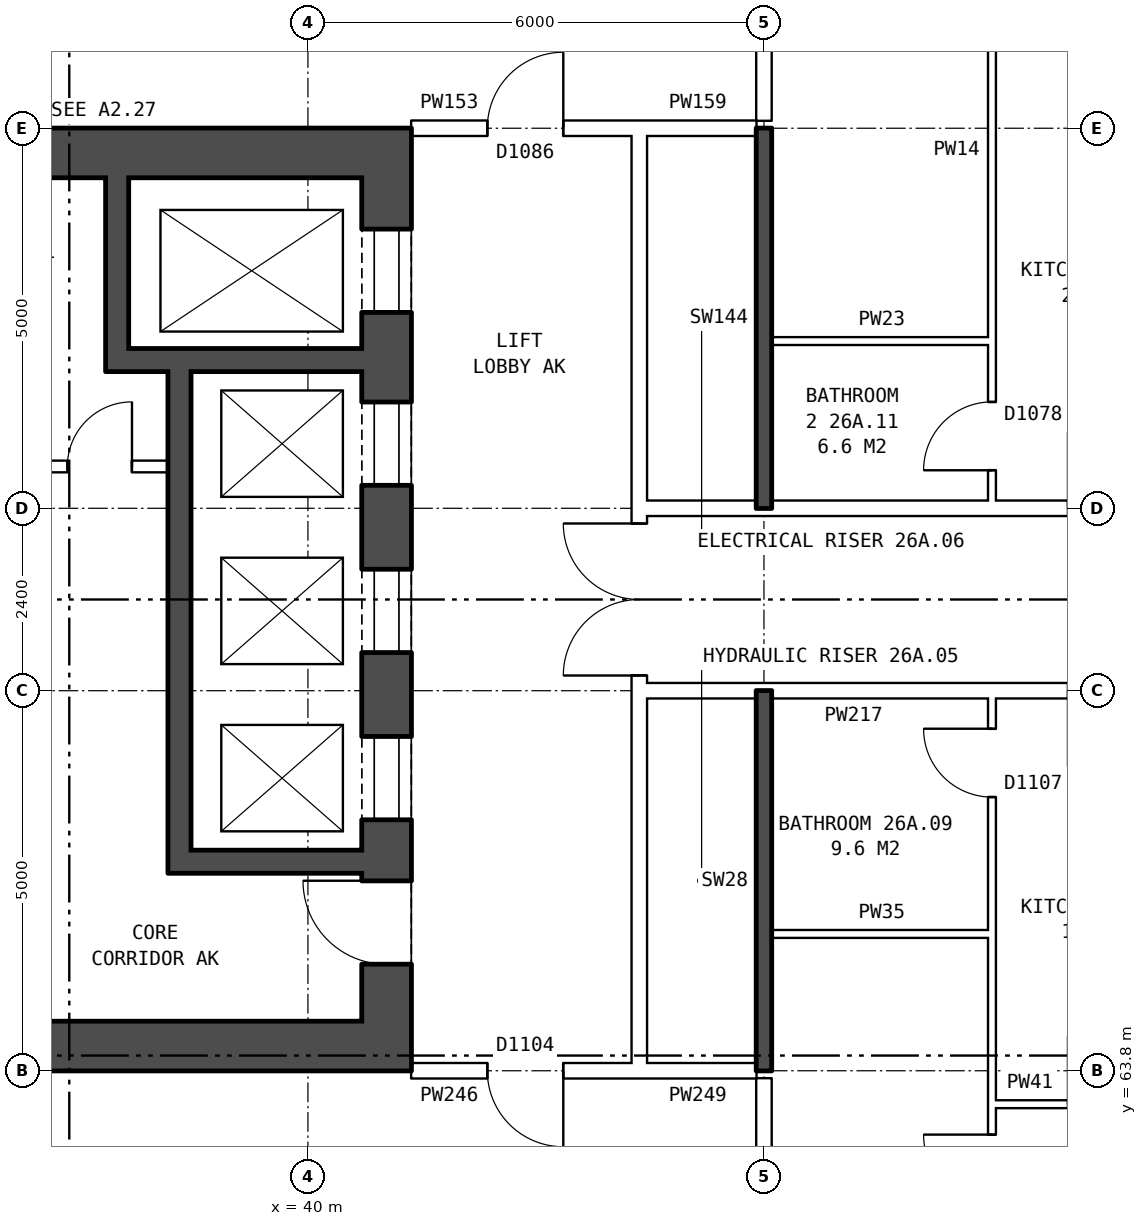
"""IFC4 building model, lengths in metres.
Left out: names, types, materials, properties, quantities, classifications, styles, units other than length and angle.
Written with IfcOpenShell. Run it as: python <this file> out.ifc"""

import sys

from ifc_helpers import new_model, si_unit, direction, frame, frame_2d, origin, place, context, subcontext, project, spatial, rectangle, extrude, element, fill, save


model = new_model("IFC4")
c1 = context("Model", 3, precision=1e-05, world=origin(), true_north=direction((0.0, 1.0)))
c2 = subcontext(c1, "Body", "Model", "MODEL_VIEW")
j1 = project(units=[si_unit("LENGTHUNIT", "METRE"), si_unit("PLANEANGLEUNIT", "RADIAN")], contexts=[c1])
p1 = place(None, origin())
s1 = spatial("IfcSite", under=j1, at=p1, CompositionType="ELEMENT")
p2 = place(p1, origin())
s2 = spatial("IfcBuilding", under=s1, at=p2, CompositionType="ELEMENT")
p3 = place(p2, frame((0.0, 0.0, 96.4)))
s3 = spatial("IfcBuildingStorey", under=s2, at=p3, CompositionType="ELEMENT", Elevation=96.4)
p4 = place(p3, frame((41.035, 75.55, 0.0), z_axis=(0.0, 0.0, 1.0), x_axis=(0.0, -1.0, 0.0)))
e1 = element("IfcWall", 1, at=p4, inside=s3, PredefinedType="SHEAR", context=c2, shape_type="SweptSolid", body=[
    extrude(rectangle(XDim=11.1, YDim=0.65, at=frame_2d((5.55, 0.0))), origin(), (0.0, 0.0, 1.0), 2.85),
])
p5 = place(p4, frame((0.675, 0.0, 0.0)))
e2 = element("IfcOpeningElement", 2, at=p5, cuts=e1, PredefinedType="OPENING", context=c2, shape_type="SweptSolid", body=[
    extrude(rectangle(XDim=1.1, YDim=2.1, at=frame_2d((0.55, 1.05))), frame((0.0, 0.335, 0.0), z_axis=(0.0, -1.0, 0.0), x_axis=(1.0, 0.0, 0.0)), (0.0, 0.0, 1.0), 0.67),
])
p6 = place(p4, frame((2.95, 0.0, 0.0)))
e3 = element("IfcOpeningElement", 3, at=p6, cuts=e1, PredefinedType="OPENING", context=c2, shape_type="SweptSolid", body=[
    extrude(rectangle(XDim=1.1, YDim=2.1, at=frame_2d((0.55, 1.05))), frame((0.0, 0.335, 0.0), z_axis=(0.0, -1.0, 0.0), x_axis=(1.0, 0.0, 0.0)), (0.0, 0.0, 1.0), 0.67),
])
p7 = place(p4, frame((5.15, 0.0, 0.0)))
e4 = element("IfcOpeningElement", 4, at=p7, cuts=e1, PredefinedType="OPENING", context=c2, shape_type="SweptSolid", body=[
    extrude(rectangle(XDim=1.1, YDim=2.1, at=frame_2d((0.55, 1.05))), frame((0.0, 0.335, 0.0), z_axis=(0.0, -1.0, 0.0), x_axis=(1.0, 0.0, 0.0)), (0.0, 0.0, 1.0), 0.67),
])
p8 = place(p4, frame((7.35, 0.0, 0.0)))
e5 = element("IfcOpeningElement", 5, at=p8, cuts=e1, PredefinedType="OPENING", context=c2, shape_type="SweptSolid", body=[
    extrude(rectangle(XDim=1.1, YDim=2.1, at=frame_2d((0.55, 1.05))), frame((0.0, 0.335, 0.0), z_axis=(0.0, -1.0, 0.0), x_axis=(1.0, 0.0, 0.0)), (0.0, 0.0, 1.0), 0.67),
])
p9 = place(p4, frame((9.25, 0.0, 0.0)))
e6 = element("IfcOpeningElement", 6, at=p9, cuts=e1, PredefinedType="OPENING", context=c2, shape_type="SweptSolid", body=[
    extrude(rectangle(XDim=1.1, YDim=2.1, at=frame_2d((0.55, 1.05))), frame((0.0, 0.335, 0.0), z_axis=(0.0, -1.0, 0.0), x_axis=(1.0, 0.0, 0.0)), (0.0, 0.0, 1.0), 0.67),
])
for number, where, z_axis, x_axis in (
    (7, (41.36, 75.875, 0.0), (0.0, 0.0, 1.0), (-1.0, 0.0, 0.0)),
    (8, (41.36, 64.125, 0.0), (0.0, 0.0, 1.0), (-1.0, 0.0, 0.0)),
):
    element("IfcWall", number, at=place(p3, frame(where, z_axis=z_axis, x_axis=x_axis)), inside=s3, PredefinedType="SHEAR", context=c2, shape_type="SweptSolid", body=[
        extrude(rectangle(XDim=9.0, YDim=0.65, at=frame_2d((4.5, 0.0))), origin(), (0.0, 0.0, 1.0), 2.85),
    ])
p10 = place(p3, frame((40.71, 73.15, 0.0), z_axis=(0.0, 0.0, 1.0), x_axis=(-1.0, 0.0, 0.0)))
e9 = element("IfcWall", 9, at=p10, inside=s3, PredefinedType="SHEAR", context=c2, shape_type="SweptSolid", body=[
    extrude(rectangle(XDim=3.37, YDim=0.3, at=frame_2d((1.685, 0.0))), origin(), (0.0, 0.0, 1.0), 2.85),
])
p11 = place(p3, frame((38.16, 71.75, 0.0), z_axis=(0.0, 0.0, 1.0), x_axis=(-1.0, 0.0, 0.0)))
e10 = element("IfcWall", 10, at=p11, inside=s3, PredefinedType="PARTITIONING", context=c2, shape_type="SweptSolid", body=[
    extrude(rectangle(XDim=1.8, YDim=0.15, at=frame_2d((0.9, 0.0))), origin(), (0.0, 0.0, 1.0), 2.85),
])
p12 = place(p11, frame((0.475, 0.0, 0.0)))
e11 = element("IfcOpeningElement", 11, at=p12, cuts=e10, PredefinedType="OPENING", context=c2, shape_type="SweptSolid", body=[
    extrude(rectangle(XDim=0.85, YDim=2.1, at=frame_2d((0.425, 1.05))), frame((0.0, 0.085, 0.0), z_axis=(0.0, -1.0, 0.0), x_axis=(1.0, 0.0, 0.0)), (0.0, 0.0, 1.0), 0.17),
])
p13 = place(p3, frame((40.71, 66.55, 0.0), z_axis=(0.0, 0.0, 1.0), x_axis=(-1.0, 0.0, 0.0)))
e12 = element("IfcWall", 12, at=p13, inside=s3, PredefinedType="SHEAR", context=c2, shape_type="SweptSolid", body=[
    extrude(rectangle(XDim=2.25, YDim=0.3, at=frame_2d((1.125, 0.0))), origin(), (0.0, 0.0, 1.0), 2.85),
])
p14 = place(p3, frame((38.31, 73.0, 0.0), z_axis=(0.0, 0.0, 1.0), x_axis=(0.0, -1.0, 0.0)))
e13 = element("IfcWall", 13, at=p14, inside=s3, PredefinedType="SHEAR", context=c2, shape_type="SweptSolid", body=[
    extrude(rectangle(XDim=6.6, YDim=0.3, at=frame_2d((3.3, 0.0))), origin(), (0.0, 0.0, 1.0), 2.85),
])
p15 = place(p3, frame((37.49, 75.55, 0.0), z_axis=(0.0, 0.0, 1.0), x_axis=(0.0, -1.0, 0.0)))
e14 = element("IfcWall", 14, at=p15, inside=s3, PredefinedType="SHEAR", context=c2, shape_type="SweptSolid", body=[
    extrude(rectangle(XDim=2.25, YDim=0.3, at=frame_2d((1.125, 0.0))), origin(), (0.0, 0.0, 1.0), 2.85),
])
p16 = place(p3, frame((44.36, 63.9, 0.0), z_axis=(0.0, 0.0, 1.0), x_axis=(0.0, 1.0, 0.0)))
e15 = element("IfcWall", 15, at=p16, inside=s3, PredefinedType="PARTITIONING", context=c2, shape_type="SweptSolid", body=[
    extrude(rectangle(XDim=12.2, YDim=0.2, at=frame_2d((6.1, 0.0))), origin(), (0.0, 0.0, 1.0), 2.85),
])
p17 = place(p16, frame((5.1, 0.0, 0.0)))
e16 = element("IfcOpeningElement", 16, at=p17, cuts=e15, PredefinedType="OPENING", context=c2, shape_type="SweptSolid", body=[
    extrude(rectangle(XDim=2.0, YDim=2.1, at=frame_2d((1.0, 1.05))), frame((0.0, 0.11, 0.0), z_axis=(0.0, -1.0, 0.0), x_axis=(1.0, 0.0, 0.0)), (0.0, 0.0, 1.0), 0.22),
])
p18 = place(p3, frame((49.0, 63.36, 0.0), z_axis=(0.0, 0.0, 1.0), x_axis=(1.0, 0.0, 0.0)))
e17 = element("IfcWall", 17, at=p18, inside=s3, PredefinedType="PARTITIONING", context=c2, shape_type="SweptSolid", body=[
    extrude(rectangle(XDim=2.9, YDim=0.1, at=frame_2d((1.45, 0.0))), origin(), (0.0, 0.0, 1.0), 2.85),
])
p19 = place(p18, frame((1.0, 0.0, 0.0)))
e18 = element("IfcOpeningElement", 18, at=p19, cuts=e17, PredefinedType="OPENING", context=c2, shape_type="SweptSolid", body=[
    extrude(rectangle(XDim=0.9, YDim=2.1, at=frame_2d((0.45, 1.05))), frame((0.0, 0.06, 0.0), z_axis=(0.0, -1.0, 0.0), x_axis=(1.0, 0.0, 0.0)), (0.0, 0.0, 1.0), 0.12),
])
p20 = place(p3, frame((41.36, 63.8, 0.0), z_axis=(0.0, 0.0, 1.0), x_axis=(1.0, 0.0, 0.0)))
e19 = element("IfcWall", 19, at=p20, inside=s3, PredefinedType="PARTITIONING", context=c2, shape_type="SweptSolid", body=[
    extrude(rectangle(XDim=3.0, YDim=0.2, at=frame_2d((1.5, 0.0))), origin(), (0.0, 0.0, 1.0), 2.85),
])
p21 = place(p20, frame((1.0, 0.0, 0.0)))
e20 = element("IfcOpeningElement", 20, at=p21, cuts=e19, PredefinedType="OPENING", context=c2, shape_type="SweptSolid", body=[
    extrude(rectangle(XDim=1.0, YDim=2.1, at=frame_2d((0.5, 1.05))), frame((0.0, 0.11, 0.0), z_axis=(0.0, -1.0, 0.0), x_axis=(1.0, 0.0, 0.0)), (0.0, 0.0, 1.0), 0.22),
])
p22 = place(p3, frame((44.36, 63.8, 0.0), z_axis=(0.0, 0.0, 1.0), x_axis=(1.0, 0.0, 0.0)))
e21 = element("IfcWall", 21, at=p22, inside=s3, PredefinedType="PARTITIONING", context=c2, shape_type="SweptSolid", body=[
    extrude(rectangle(XDim=1.54, YDim=0.2, at=frame_2d((0.77, 0.0))), origin(), (0.0, 0.0, 1.0), 2.85),
])
p23 = place(p3, frame((46.1, 65.6, 0.0), z_axis=(0.0, 0.0, 1.0), x_axis=(1.0, 0.0, 0.0)))
e22 = element("IfcWall", 22, at=p23, inside=s3, PredefinedType="PARTITIONING", context=c2, shape_type="SweptSolid", body=[
    extrude(rectangle(XDim=2.9, YDim=0.1, at=frame_2d((1.45, 0.0))), origin(), (0.0, 0.0, 1.0), 2.85),
])
p24 = place(p3, frame((44.36, 68.8, 0.0), z_axis=(0.0, 0.0, 1.0), x_axis=(1.0, 0.0, 0.0)))
e23 = element("IfcWall", 23, at=p24, inside=s3, PredefinedType="PARTITIONING", context=c2, shape_type="SweptSolid", body=[
    extrude(rectangle(XDim=19.28, YDim=0.2, at=frame_2d((9.64, 0.0))), origin(), (0.0, 0.0, 1.0), 2.85),
])
p25 = place(p24, frame((14.64, 0.0, 0.0)))
e24 = element("IfcOpeningElement", 24, at=p25, cuts=e23, PredefinedType="OPENING", context=c2, shape_type="SweptSolid", body=[
    extrude(rectangle(XDim=1.0, YDim=2.1, at=frame_2d((0.5, 1.05))), frame((0.0, 0.11, 0.0), z_axis=(0.0, -1.0, 0.0), x_axis=(1.0, 0.0, 0.0)), (0.0, 0.0, 1.0), 0.22),
])
p26 = place(p24, frame((11.64, 0.0, 0.0)))
e25 = element("IfcOpeningElement", 25, at=p26, cuts=e23, PredefinedType="OPENING", context=c2, shape_type="SweptSolid", body=[
    extrude(rectangle(XDim=1.0, YDim=2.1, at=frame_2d((0.5, 1.05))), frame((0.0, 0.11, 0.0), z_axis=(0.0, -1.0, 0.0), x_axis=(1.0, 0.0, 0.0)), (0.0, 0.0, 1.0), 0.22),
])
p27 = place(p24, frame((5.64, 0.0, 0.0)))
e26 = element("IfcOpeningElement", 26, at=p27, cuts=e23, PredefinedType="OPENING", context=c2, shape_type="SweptSolid", body=[
    extrude(rectangle(XDim=1.0, YDim=2.1, at=frame_2d((0.5, 1.05))), frame((0.0, 0.11, 0.0), z_axis=(0.0, -1.0, 0.0), x_axis=(1.0, 0.0, 0.0)), (0.0, 0.0, 1.0), 0.22),
])
p28 = place(p3, frame((44.36, 71.2, 0.0), z_axis=(0.0, 0.0, 1.0), x_axis=(1.0, 0.0, 0.0)))
e27 = element("IfcWall", 27, at=p28, inside=s3, PredefinedType="PARTITIONING", context=c2, shape_type="SweptSolid", body=[
    extrude(rectangle(XDim=19.28, YDim=0.2, at=frame_2d((9.64, 0.0))), origin(), (0.0, 0.0, 1.0), 2.85),
])
p29 = place(p28, frame((14.64, 0.0, 0.0)))
e28 = element("IfcOpeningElement", 28, at=p29, cuts=e27, PredefinedType="OPENING", context=c2, shape_type="SweptSolid", body=[
    extrude(rectangle(XDim=1.0, YDim=2.1, at=frame_2d((0.5, 1.05))), frame((0.0, 0.11, 0.0), z_axis=(0.0, -1.0, 0.0), x_axis=(1.0, 0.0, 0.0)), (0.0, 0.0, 1.0), 0.22),
])
p30 = place(p28, frame((5.64, 0.0, 0.0)))
e29 = element("IfcOpeningElement", 29, at=p30, cuts=e27, PredefinedType="OPENING", context=c2, shape_type="SweptSolid", body=[
    extrude(rectangle(XDim=1.0, YDim=2.1, at=frame_2d((0.5, 1.05))), frame((0.0, 0.11, 0.0), z_axis=(0.0, -1.0, 0.0), x_axis=(1.0, 0.0, 0.0)), (0.0, 0.0, 1.0), 0.22),
])
p31 = place(p3, frame((46.1, 73.4, 0.0), z_axis=(0.0, 0.0, 1.0), x_axis=(1.0, 0.0, 0.0)))
e30 = element("IfcWall", 30, at=p31, inside=s3, PredefinedType="PARTITIONING", context=c2, shape_type="SweptSolid", body=[
    extrude(rectangle(XDim=2.9, YDim=0.1, at=frame_2d((1.45, 0.0))), origin(), (0.0, 0.0, 1.0), 2.85),
])
p32 = place(p3, frame((41.36, 76.2, 0.0), z_axis=(0.0, 0.0, 1.0), x_axis=(1.0, 0.0, 0.0)))
e31 = element("IfcWall", 31, at=p32, inside=s3, PredefinedType="PARTITIONING", context=c2, shape_type="SweptSolid", body=[
    extrude(rectangle(XDim=3.0, YDim=0.2, at=frame_2d((1.5, 0.0))), origin(), (0.0, 0.0, 1.0), 2.85),
])
p33 = place(p32, frame((1.0, 0.0, 0.0)))
e32 = element("IfcOpeningElement", 32, at=p33, cuts=e31, PredefinedType="OPENING", context=c2, shape_type="SweptSolid", body=[
    extrude(rectangle(XDim=1.0, YDim=2.1, at=frame_2d((0.5, 1.05))), frame((0.0, 0.11, 0.0), z_axis=(0.0, -1.0, 0.0), x_axis=(1.0, 0.0, 0.0)), (0.0, 0.0, 1.0), 0.22),
])
p34 = place(p3, frame((44.36, 76.2, 0.0), z_axis=(0.0, 0.0, 1.0), x_axis=(1.0, 0.0, 0.0)))
e33 = element("IfcWall", 33, at=p34, inside=s3, PredefinedType="PARTITIONING", context=c2, shape_type="SweptSolid", body=[
    extrude(rectangle(XDim=1.54, YDim=0.2, at=frame_2d((0.77, 0.0))), origin(), (0.0, 0.0, 1.0), 2.85),
])
p35 = place(p3, frame((46.0, 61.5, 0.0), z_axis=(0.0, 0.0, 1.0), x_axis=(0.0, 1.0, 0.0)))
e34 = element("IfcWall", 34, at=p35, inside=s3, PredefinedType="PARTITIONING", context=c2, shape_type="SweptSolid", body=[
    extrude(rectangle(XDim=2.2, YDim=0.2, at=frame_2d((1.1, 0.0))), origin(), (0.0, 0.0, 1.0), 2.85),
])
for number, where, z_axis, x_axis in (
    (35, (46.0, 63.8, 0.0), (0.0, 0.0, 1.0), (0.0, 1.0, 0.0)),
    (36, (46.0, 71.2, 0.0), (0.0, 0.0, 1.0), (0.0, 1.0, 0.0)),
):
    element("IfcWall", number, at=place(p3, frame(where, z_axis=z_axis, x_axis=x_axis)), inside=s3, PredefinedType="SOLIDWALL", context=c2, shape_type="SweptSolid", body=[
        extrude(rectangle(XDim=5.0, YDim=0.2, at=frame_2d((2.5, 0.0))), origin(), (0.0, 0.0, 1.0), 2.85),
    ])
p36 = place(p3, frame((46.0, 76.3, 0.0), z_axis=(0.0, 0.0, 1.0), x_axis=(0.0, 1.0, 0.0)))
e37 = element("IfcWall", 37, at=p36, inside=s3, PredefinedType="PARTITIONING", context=c2, shape_type="SweptSolid", body=[
    extrude(rectangle(XDim=2.2, YDim=0.2, at=frame_2d((1.1, 0.0))), origin(), (0.0, 0.0, 1.0), 2.85),
])
p37 = place(p3, frame((49.0, 54.36, 0.0), z_axis=(0.0, 0.0, 1.0), x_axis=(0.0, 1.0, 0.0)))
e38 = element("IfcWall", 38, at=p37, inside=s3, PredefinedType="PARTITIONING", context=c2, shape_type="SweptSolid", body=[
    extrude(rectangle(XDim=14.34, YDim=0.1, at=frame_2d((7.17, 0.0))), origin(), (0.0, 0.0, 1.0), 2.85),
])
p38 = place(p37, frame((7.7, 0.0, 0.0)))
e39 = element("IfcOpeningElement", 39, at=p38, cuts=e38, PredefinedType="OPENING", context=c2, shape_type="SweptSolid", body=[
    extrude(rectangle(XDim=0.9, YDim=2.1, at=frame_2d((0.45, 1.05))), frame((0.0, 0.06, 0.0), z_axis=(0.0, -1.0, 0.0), x_axis=(1.0, 0.0, 0.0)), (0.0, 0.0, 1.0), 0.12),
])
p39 = place(p37, frame((13.04, 0.0, 0.0)))
e40 = element("IfcOpeningElement", 40, at=p39, cuts=e38, PredefinedType="OPENING", context=c2, shape_type="SweptSolid", body=[
    extrude(rectangle(XDim=0.9, YDim=2.1, at=frame_2d((0.45, 1.05))), frame((0.0, 0.06, 0.0), z_axis=(0.0, -1.0, 0.0), x_axis=(1.0, 0.0, 0.0)), (0.0, 0.0, 1.0), 0.12),
])
p40 = place(p3, frame((49.0, 71.3, 0.0), z_axis=(0.0, 0.0, 1.0), x_axis=(0.0, 1.0, 0.0)))
e41 = element("IfcWall", 41, at=p40, inside=s3, PredefinedType="PARTITIONING", context=c2, shape_type="SweptSolid", body=[
    extrude(rectangle(XDim=14.34, YDim=0.1, at=frame_2d((7.17, 0.0))), origin(), (0.0, 0.0, 1.0), 2.85),
])
p41 = place(p40, frame((7.94, 0.0, 0.0)))
e42 = element("IfcOpeningElement", 42, at=p41, cuts=e41, PredefinedType="OPENING", context=c2, shape_type="SweptSolid", body=[
    extrude(rectangle(XDim=0.9, YDim=2.1, at=frame_2d((0.45, 1.05))), frame((0.0, 0.06, 0.0), z_axis=(0.0, -1.0, 0.0), x_axis=(1.0, 0.0, 0.0)), (0.0, 0.0, 1.0), 0.12),
])
p42 = place(p40, frame((0.4, 0.0, 0.0)))
e43 = element("IfcOpeningElement", 43, at=p42, cuts=e41, PredefinedType="OPENING", context=c2, shape_type="SweptSolid", body=[
    extrude(rectangle(XDim=0.9, YDim=2.1, at=frame_2d((0.45, 1.05))), frame((0.0, 0.06, 0.0), z_axis=(0.0, -1.0, 0.0), x_axis=(1.0, 0.0, 0.0)), (0.0, 0.0, 1.0), 0.12),
])
p43 = place(p5, origin())
e44 = element("IfcDoor", 44, at=p43, inside=s3, OperationType="DOUBLE_DOOR_SLIDING", PredefinedType="DOOR", context=c2, shape_type="SweptSolid", body=[
    extrude(rectangle(XDim=1.1, YDim=2.1, at=frame_2d((0.55, 1.05))), frame((0.0, -0.26, 0.0), z_axis=(0.0, -1.0, 0.0), x_axis=(1.0, 0.0, 0.0)), (0.0, 0.0, 1.0), 0.05),
])
fill(e2, e44)
p44 = place(p6, origin())
e45 = element("IfcDoor", 45, at=p44, inside=s3, OperationType="DOUBLE_DOOR_SLIDING", PredefinedType="DOOR", context=c2, shape_type="SweptSolid", body=[
    extrude(rectangle(XDim=1.1, YDim=2.1, at=frame_2d((0.55, 1.05))), frame((0.0, -0.26, 0.0), z_axis=(0.0, -1.0, 0.0), x_axis=(1.0, 0.0, 0.0)), (0.0, 0.0, 1.0), 0.05),
])
fill(e3, e45)
p45 = place(p7, origin())
e46 = element("IfcDoor", 46, at=p45, inside=s3, OperationType="DOUBLE_DOOR_SLIDING", PredefinedType="DOOR", context=c2, shape_type="SweptSolid", body=[
    extrude(rectangle(XDim=1.1, YDim=2.1, at=frame_2d((0.55, 1.05))), frame((0.0, -0.26, 0.0), z_axis=(0.0, -1.0, 0.0), x_axis=(1.0, 0.0, 0.0)), (0.0, 0.0, 1.0), 0.05),
])
fill(e4, e46)
p46 = place(p8, origin())
e47 = element("IfcDoor", 47, at=p46, inside=s3, OperationType="DOUBLE_DOOR_SLIDING", PredefinedType="DOOR", context=c2, shape_type="SweptSolid", body=[
    extrude(rectangle(XDim=1.1, YDim=2.1, at=frame_2d((0.55, 1.05))), frame((0.0, -0.26, 0.0), z_axis=(0.0, -1.0, 0.0), x_axis=(1.0, 0.0, 0.0)), (0.0, 0.0, 1.0), 0.05),
])
fill(e5, e47)
p47 = place(p9, frame((1.1, 0.0, 0.0), z_axis=(0.0, 0.0, 1.0), x_axis=(-1.0, 0.0, 0.0)))
e48 = element("IfcDoor", 48, at=p47, inside=s3, OperationType="SINGLE_SWING_RIGHT", PredefinedType="DOOR", context=c2, shape_type="SweptSolid", body=[
    extrude(rectangle(XDim=1.1, YDim=2.1, at=frame_2d((0.55, 1.05))), frame((0.0, 0.31, 0.0), z_axis=(0.0, -1.0, 0.0), x_axis=(1.0, 0.0, 0.0)), (0.0, 0.0, 1.0), 0.05),
])
fill(e6, e48)
p48 = place(p12, frame((0.85, 0.0, 0.0), z_axis=(0.0, 0.0, 1.0), x_axis=(-1.0, 0.0, 0.0)))
e49 = element("IfcDoor", 49, at=p48, inside=s3, OperationType="SINGLE_SWING_RIGHT", PredefinedType="DOOR", context=c2, shape_type="SweptSolid", body=[
    extrude(rectangle(XDim=0.85, YDim=2.1, at=frame_2d((0.425, 1.05))), frame((0.0, 0.025, 0.0), z_axis=(0.0, -1.0, 0.0), x_axis=(1.0, 0.0, 0.0)), (0.0, 0.0, 1.0), 0.05),
])
fill(e11, e49)
p49 = place(p17, origin())
e50 = element("IfcDoor", 50, at=p49, inside=s3, OperationType="DOUBLE_DOOR_SINGLE_SWING", PredefinedType="DOOR", context=c2, shape_type="SweptSolid", body=[
    extrude(rectangle(XDim=2.0, YDim=2.1, at=frame_2d((1.0, 1.05))), frame((0.0, 0.025, 0.0), z_axis=(0.0, -1.0, 0.0), x_axis=(1.0, 0.0, 0.0)), (0.0, 0.0, 1.0), 0.05),
])
fill(e16, e50)
p50 = place(p21, frame((1.0, 0.0, 0.0), z_axis=(0.0, 0.0, 1.0), x_axis=(-1.0, 0.0, 0.0)))
e51 = element("IfcDoor", 51, at=p50, inside=s3, OperationType="SINGLE_SWING_LEFT", PredefinedType="DOOR", context=c2, shape_type="SweptSolid", body=[
    extrude(rectangle(XDim=1.0, YDim=2.1, at=frame_2d((0.5, 1.05))), frame((0.0, 0.025, 0.0), z_axis=(0.0, -1.0, 0.0), x_axis=(1.0, 0.0, 0.0)), (0.0, 0.0, 1.0), 0.05),
])
fill(e20, e51)
p51 = place(p33, origin())
e52 = element("IfcDoor", 52, at=p51, inside=s3, OperationType="SINGLE_SWING_RIGHT", PredefinedType="DOOR", context=c2, shape_type="SweptSolid", body=[
    extrude(rectangle(XDim=1.0, YDim=2.1, at=frame_2d((0.5, 1.05))), frame((0.0, 0.025, 0.0), z_axis=(0.0, -1.0, 0.0), x_axis=(1.0, 0.0, 0.0)), (0.0, 0.0, 1.0), 0.05),
])
fill(e32, e52)
p52 = place(p38, origin())
e53 = element("IfcDoor", 53, at=p52, inside=s3, OperationType="SINGLE_SWING_RIGHT", PredefinedType="DOOR", context=c2, shape_type="SweptSolid", body=[
    extrude(rectangle(XDim=0.9, YDim=2.1, at=frame_2d((0.45, 1.05))), frame((0.0, 0.025, 0.0), z_axis=(0.0, -1.0, 0.0), x_axis=(1.0, 0.0, 0.0)), (0.0, 0.0, 1.0), 0.05),
])
fill(e39, e53)
p53 = place(p39, origin())
e54 = element("IfcDoor", 54, at=p53, inside=s3, OperationType="SINGLE_SWING_RIGHT", PredefinedType="DOOR", context=c2, shape_type="SweptSolid", body=[
    extrude(rectangle(XDim=0.9, YDim=2.1, at=frame_2d((0.45, 1.05))), frame((0.0, 0.025, 0.0), z_axis=(0.0, -1.0, 0.0), x_axis=(1.0, 0.0, 0.0)), (0.0, 0.0, 1.0), 0.05),
])
fill(e40, e54)
p54 = place(p42, origin())
e55 = element("IfcDoor", 55, at=p54, inside=s3, OperationType="SINGLE_SWING_LEFT", PredefinedType="DOOR", context=c2, shape_type="SweptSolid", body=[
    extrude(rectangle(XDim=0.9, YDim=2.1, at=frame_2d((0.45, 1.05))), frame((0.0, 0.025, 0.0), z_axis=(0.0, -1.0, 0.0), x_axis=(1.0, 0.0, 0.0)), (0.0, 0.0, 1.0), 0.05),
])
fill(e43, e55)
save(model, sys.argv[1])
